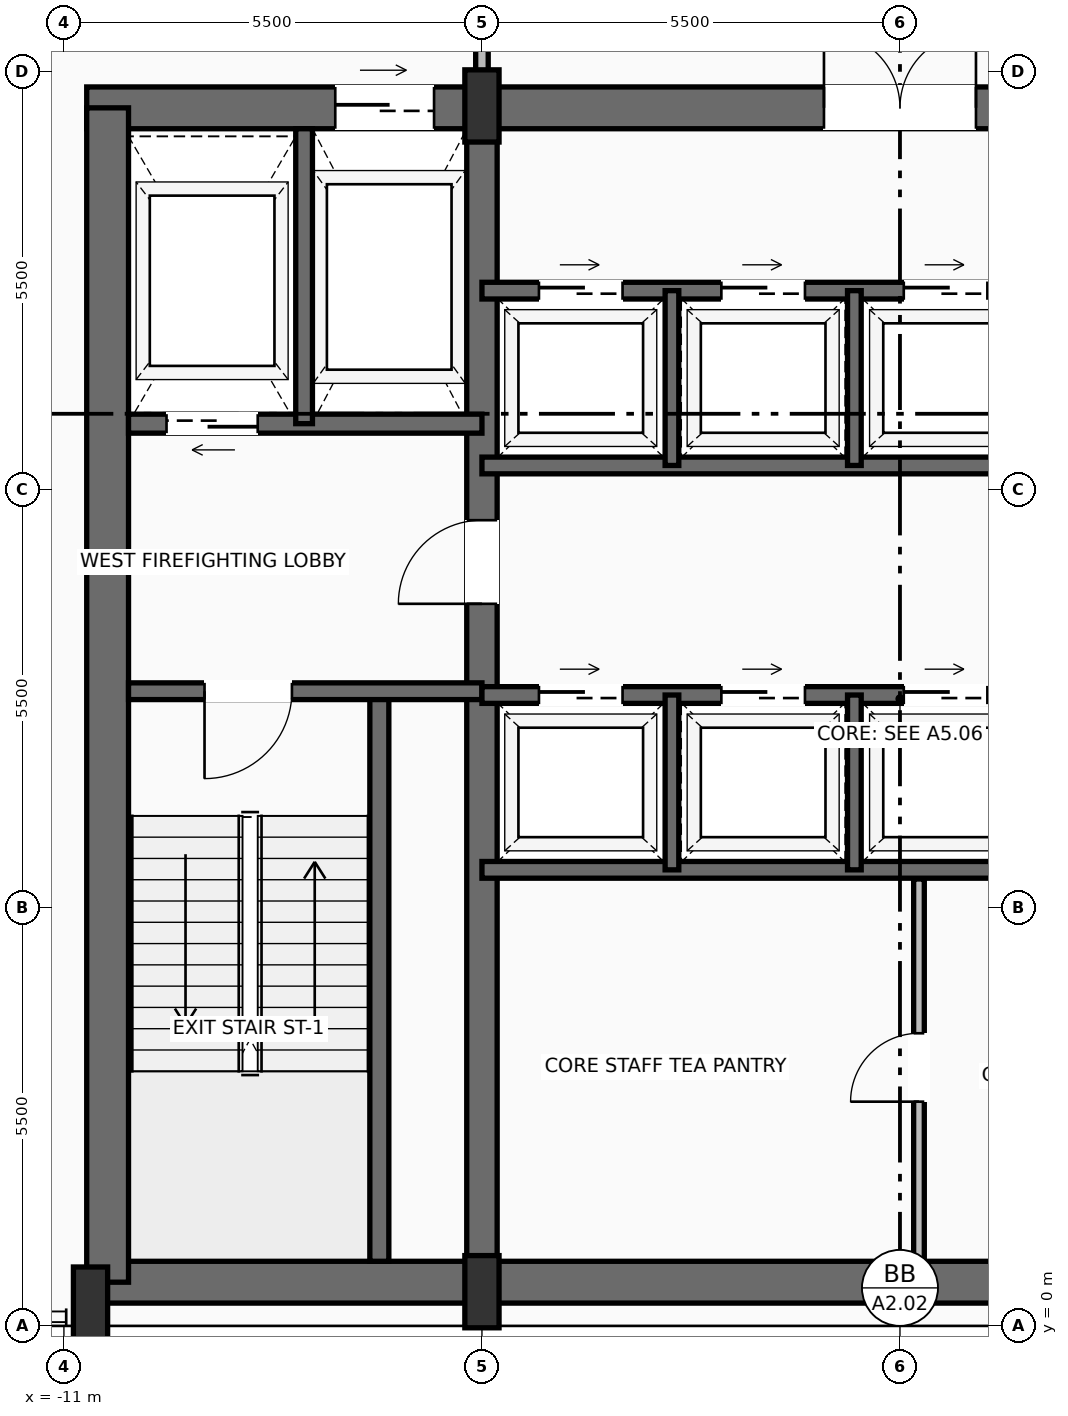
"""IFC4 building model, lengths in metres.
Left out: names, types, materials, properties, quantities, classifications, styles, units other than length and angle.
Written with IfcOpenShell. Run it as: python <this file> out.ifc"""

import sys

from ifc_helpers import new_model, si_unit, direction, frame, frame_2d, origin, origin_2d, place, context, subcontext, project, spatial, rectangle, extrude, source, transform, mapped, element, fill, save


model = new_model("IFC4")
c1 = context("Model", 3, precision=1e-05, world=origin(), true_north=direction((0.0, 1.0)))
c2 = subcontext(c1, "Body", "Model", "MODEL_VIEW")
j1 = project(units=[si_unit("LENGTHUNIT", "METRE"), si_unit("PLANEANGLEUNIT", "RADIAN")], contexts=[c1])
p1 = place(None, origin())
s1 = spatial("IfcSite", under=j1, at=p1, CompositionType="ELEMENT")
p2 = place(p1, origin())
s2 = spatial("IfcBuilding", under=s1, at=p2, CompositionType="ELEMENT")
p3 = place(p2, frame((0.0, 0.0, 215.4)))
s3 = spatial("IfcBuildingStorey", under=s2, at=p3, CompositionType="ELEMENT", Elevation=215.4)
p4 = place(p3, frame((-10.65, 0.575, 0.0), z_axis=(0.0, 0.0, 1.0), x_axis=(1.0, 0.0, 0.0)))
e1 = element("IfcWall", 1, at=p4, inside=s3, PredefinedType="SHEAR", context=c2, shape_type="SweptSolid", body=[
    extrude(rectangle(XDim=21.3, YDim=0.55, at=frame_2d((10.65, 0.0))), origin(), (0.0, 0.0, 1.0), 4.39),
])
p5 = place(p3, frame((-10.7, 16.025, 0.0), z_axis=(0.0, 0.0, 1.0), x_axis=(1.0, 0.0, 0.0)))
e2 = element("IfcWall", 2, at=p5, inside=s3, PredefinedType="SHEAR", context=c2, shape_type="SweptSolid", body=[
    extrude(rectangle(XDim=21.4, YDim=0.55, at=frame_2d((10.7, 0.0))), origin(), (0.0, 0.0, 1.0), 4.39),
])
p6 = place(p5, frame((3.27, 0.0, 0.0)))
e3 = element("IfcOpeningElement", 3, at=p6, cuts=e2, PredefinedType="OPENING", context=c2, shape_type="SweptSolid", body=[
    extrude(rectangle(XDim=1.3, YDim=2.3, at=frame_2d((0.65, 1.15))), frame((0.0, 0.285, 0.0), z_axis=(0.0, -1.0, 0.0), x_axis=(1.0, 0.0, 0.0)), (0.0, 0.0, 1.0), 0.57),
])
p7 = place(p5, frame((9.7, 0.0, 0.0)))
e4 = element("IfcOpeningElement", 4, at=p7, cuts=e2, PredefinedType="OPENING", context=c2, shape_type="SweptSolid", body=[
    extrude(rectangle(XDim=2.0, YDim=2.4, at=frame_2d((1.0, 1.2))), frame((0.0, 0.285, 0.0), z_axis=(0.0, -1.0, 0.0), x_axis=(1.0, 0.0, 0.0)), (0.0, 0.0, 1.0), 0.57),
])
p8 = place(p3, frame((-10.425, 0.575, 0.0), z_axis=(0.0, 0.0, 1.0), x_axis=(0.0, 1.0, 0.0)))
e5 = element("IfcWall", 5, at=p8, inside=s3, PredefinedType="SHEAR", context=c2, shape_type="SweptSolid", body=[
    extrude(rectangle(XDim=15.45, YDim=0.55, at=frame_2d((7.725, 0.0))), origin(), (0.0, 0.0, 1.0), 4.39),
])
p9 = place(p3, frame((-5.5, 0.575, 0.0), z_axis=(0.0, 0.0, 1.0), x_axis=(0.0, 1.0, 0.0)))
e6 = element("IfcWall", 6, at=p9, inside=s3, PredefinedType="SHEAR", context=c2, shape_type="SweptSolid", body=[
    extrude(rectangle(XDim=15.45, YDim=0.4, at=frame_2d((7.725, 0.0))), origin(), (0.0, 0.0, 1.0), 4.39),
])
p10 = place(p9, frame((8.925, 0.0, 0.0)))
e7 = element("IfcOpeningElement", 7, at=p10, cuts=e6, PredefinedType="OPENING", context=c2, shape_type="SweptSolid", body=[
    extrude(rectangle(XDim=1.1, YDim=2.2, at=frame_2d((0.55, 1.1))), frame((0.0, 0.21, 0.0), z_axis=(0.0, -1.0, 0.0), x_axis=(1.0, 0.0, 0.0)), (0.0, 0.0, 1.0), 0.42),
])
m1 = source(origin(), c2, "Body", "SweptSolid", [
    extrude(rectangle(XDim=0.45, YDim=0.95, at=origin_2d()), origin(), (0.0, 0.0, 1.0), 4.6),
])
for number, where, z_axis, x_axis in (
    (8, (-10.65, 0.3, 0.0), (0.0, 0.0, 1.0), (1.0, 0.0, 0.0)),
    (9, (-5.5, 0.45, 0.0), (0.0, 0.0, 1.0), (1.0, 0.0, 0.0)),
    (10, (-5.5, 16.05, 0.0), (0.0, 0.0, 1.0), (1.0, 0.0, 0.0)),
):
    element("IfcColumn", number, at=place(p3, frame(where, z_axis=z_axis, x_axis=x_axis)), inside=s3, PredefinedType="PILASTER", context=c2, shape_type="MappedRepresentation", body=[
        mapped(m1, transform((0.0, 0.0, 0.0), scale=1.0)),
    ])
p11 = place(p3, frame((-19.903, 15.656, 0.0), z_axis=(0.0, 0.0, 1.0), x_axis=(0.516051519047, 0.856557546047, 0.0)))
e11 = element("IfcWall", 11, at=p11, inside=s3, PredefinedType="SOLIDWALL", context=c2, shape_type="SweptSolid", body=[
    extrude(rectangle(XDim=19.259, YDim=0.28, at=frame_2d((9.63, 0.0))), origin(), (0.0, 0.0, 1.0), 3.97),
])
p12 = place(p11, frame((4.622, 0.0, 0.0)))
e12 = element("IfcOpeningElement", 12, at=p12, cuts=e11, PredefinedType="OPENING", context=c2, shape_type="SweptSolid", body=[
    extrude(rectangle(XDim=1.6, YDim=2.35, at=frame_2d((0.8, 1.175))), frame((0.0, 0.15, 0.0), z_axis=(0.0, -1.0, 0.0), x_axis=(1.0, 0.0, 0.0)), (0.0, 0.0, 1.0), 0.3),
])
p13 = place(p11, frame((13.096, 0.0, 0.9)))
e13 = element("IfcOpeningElement", 13, at=p13, cuts=e11, PredefinedType="OPENING", context=c2, shape_type="SweptSolid", body=[
    extrude(rectangle(XDim=2.0, YDim=1.55, at=frame_2d((1.0, 0.775))), frame((0.0, 0.15, 0.0), z_axis=(0.0, -1.0, 0.0), x_axis=(1.0, 0.0, 0.0)), (0.0, 0.0, 1.0), 0.3),
])
p14 = place(p3, frame((-6.85, 0.85, 0.0), z_axis=(0.0, 0.0, 1.0), x_axis=(0.0, 1.0, 0.0)))
e14 = element("IfcWall", 14, at=p14, inside=s3, PredefinedType="SOLIDWALL", context=c2, shape_type="SweptSolid", body=[
    extrude(rectangle(XDim=7.5, YDim=0.25, at=frame_2d((3.75, 0.0))), origin(), (0.0, 0.0, 1.0), 4.39),
])
p15 = place(p3, frame((-5.5, 8.35, 0.0), z_axis=(0.0, 0.0, 1.0), x_axis=(-1.0, 0.0, 0.0)))
e15 = element("IfcWall", 15, at=p15, inside=s3, PredefinedType="SOLIDWALL", context=c2, shape_type="SweptSolid", body=[
    extrude(rectangle(XDim=4.65, YDim=0.22, at=frame_2d((2.325, 0.0))), origin(), (0.0, 0.0, 1.0), 4.39),
])
p16 = place(p15, frame((2.5, 0.0, 0.0)))
e16 = element("IfcOpeningElement", 16, at=p16, cuts=e15, PredefinedType="OPENING", context=c2, shape_type="SweptSolid", body=[
    extrude(rectangle(XDim=1.15, YDim=2.2, at=frame_2d((0.575, 1.1))), frame((0.0, 0.12, 0.0), z_axis=(0.0, -1.0, 0.0), x_axis=(1.0, 0.0, 0.0)), (0.0, 0.0, 1.0), 0.24),
])
p17 = place(p3, frame((-5.5, 11.87, 0.0), z_axis=(0.0, 0.0, 1.0), x_axis=(-1.0, 0.0, 0.0)))
e17 = element("IfcWall", 17, at=p17, inside=s3, PredefinedType="SOLIDWALL", context=c2, shape_type="SweptSolid", body=[
    extrude(rectangle(XDim=4.65, YDim=0.25, at=frame_2d((2.325, 0.0))), origin(), (0.0, 0.0, 1.0), 4.39),
])
p18 = place(p17, frame((2.95, 0.0, 0.0)))
e18 = element("IfcOpeningElement", 18, at=p18, cuts=e17, PredefinedType="OPENING", context=c2, shape_type="SweptSolid", body=[
    extrude(rectangle(XDim=1.2, YDim=2.25, at=frame_2d((0.6, 1.125))), frame((0.0, 0.135, 0.0), z_axis=(0.0, -1.0, 0.0), x_axis=(1.0, 0.0, 0.0)), (0.0, 0.0, 1.0), 0.27),
])
p19 = place(p3, frame((-7.84, 11.87, 0.0), z_axis=(0.0, 0.0, 1.0), x_axis=(0.0, 1.0, 0.0)))
e19 = element("IfcWall", 19, at=p19, inside=s3, PredefinedType="SOLIDWALL", context=c2, shape_type="SweptSolid", body=[
    extrude(rectangle(XDim=3.88, YDim=0.22, at=frame_2d((1.94, 0.0))), origin(), (0.0, 0.0, 1.0), 4.39),
])
p20 = place(p3, frame((0.25, 0.85, 0.0), z_axis=(0.0, 0.0, 1.0), x_axis=(0.0, 1.0, 0.0)))
e20 = element("IfcWall", 20, at=p20, inside=s3, PredefinedType="PARTITIONING", context=c2, shape_type="SweptSolid", body=[
    extrude(rectangle(XDim=5.03, YDim=0.14, at=frame_2d((2.515, 0.0))), origin(), (0.0, 0.0, 1.0), 4.382),
])
p21 = place(p20, frame((2.1, 0.0, 0.0)))
e21 = element("IfcOpeningElement", 21, at=p21, cuts=e20, PredefinedType="OPENING", context=c2, shape_type="SweptSolid", body=[
    extrude(rectangle(XDim=0.9, YDim=2.1, at=frame_2d((0.45, 1.05))), frame((0.0, 0.08, 0.0), z_axis=(0.0, -1.0, 0.0), x_axis=(1.0, 0.0, 0.0)), (0.0, 0.0, 1.0), 0.16),
])
p22 = place(p3, frame((-5.5, 6.0, 0.0), z_axis=(0.0, 0.0, 1.0), x_axis=(1.0, 0.0, 0.0)))
e22 = element("IfcWall", 22, at=p22, inside=s3, PredefinedType="SOLIDWALL", context=c2, shape_type="SweptSolid", body=[
    extrude(rectangle(XDim=7.32, YDim=0.22, at=frame_2d((3.66, 0.0))), origin(), (0.0, 0.0, 1.0), 4.39),
])
p23 = place(p3, frame((-5.5, 8.3, 0.0), z_axis=(0.0, 0.0, 1.0), x_axis=(1.0, 0.0, 0.0)))
e23 = element("IfcWall", 23, at=p23, inside=s3, PredefinedType="SOLIDWALL", context=c2, shape_type="SweptSolid", body=[
    extrude(rectangle(XDim=7.32, YDim=0.22, at=frame_2d((3.66, 0.0))), origin(), (0.0, 0.0, 1.0), 4.39),
])
p24 = place(p23, frame((0.75, 0.0, 0.0)))
e24 = element("IfcOpeningElement", 24, at=p24, cuts=e23, PredefinedType="OPENING", context=c2, shape_type="SweptSolid", body=[
    extrude(rectangle(XDim=1.1, YDim=2.2, at=frame_2d((0.55, 1.1))), frame((0.0, 0.12, 0.0), z_axis=(0.0, -1.0, 0.0), x_axis=(1.0, 0.0, 0.0)), (0.0, 0.0, 1.0), 0.24),
])
p25 = place(p23, frame((3.15, 0.0, 0.0)))
e25 = element("IfcOpeningElement", 25, at=p25, cuts=e23, PredefinedType="OPENING", context=c2, shape_type="SweptSolid", body=[
    extrude(rectangle(XDim=1.1, YDim=2.2, at=frame_2d((0.55, 1.1))), frame((0.0, 0.12, 0.0), z_axis=(0.0, -1.0, 0.0), x_axis=(1.0, 0.0, 0.0)), (0.0, 0.0, 1.0), 0.24),
])
p26 = place(p23, frame((5.55, 0.0, 0.0)))
e26 = element("IfcOpeningElement", 26, at=p26, cuts=e23, PredefinedType="OPENING", context=c2, shape_type="SweptSolid", body=[
    extrude(rectangle(XDim=1.1, YDim=2.2, at=frame_2d((0.55, 1.1))), frame((0.0, 0.12, 0.0), z_axis=(0.0, -1.0, 0.0), x_axis=(1.0, 0.0, 0.0)), (0.0, 0.0, 1.0), 0.24),
])
for number, where, z_axis, x_axis in (
    (27, (-3.0, 6.0, 0.0), (0.0, 0.0, 1.0), (0.0, 1.0, 0.0)),
    (28, (-0.6, 6.0, 0.0), (0.0, 0.0, 1.0), (0.0, 1.0, 0.0)),
):
    element("IfcWall", number, at=place(p3, frame(where, z_axis=z_axis, x_axis=x_axis)), inside=s3, PredefinedType="SOLIDWALL", context=c2, shape_type="SweptSolid", body=[
        extrude(rectangle(XDim=2.3, YDim=0.18, at=frame_2d((1.15, 0.0))), origin(), (0.0, 0.0, 1.0), 4.39),
    ])
p27 = place(p3, frame((-5.5, 11.32, 0.0), z_axis=(0.0, 0.0, 1.0), x_axis=(1.0, 0.0, 0.0)))
e29 = element("IfcWall", 29, at=p27, inside=s3, PredefinedType="SOLIDWALL", context=c2, shape_type="SweptSolid", body=[
    extrude(rectangle(XDim=7.32, YDim=0.22, at=frame_2d((3.66, 0.0))), origin(), (0.0, 0.0, 1.0), 4.39),
])
p28 = place(p3, frame((-5.5, 13.62, 0.0), z_axis=(0.0, 0.0, 1.0), x_axis=(1.0, 0.0, 0.0)))
e30 = element("IfcWall", 30, at=p28, inside=s3, PredefinedType="SOLIDWALL", context=c2, shape_type="SweptSolid", body=[
    extrude(rectangle(XDim=7.32, YDim=0.22, at=frame_2d((3.66, 0.0))), origin(), (0.0, 0.0, 1.0), 4.39),
])
p29 = place(p28, frame((0.75, 0.0, 0.0)))
e31 = element("IfcOpeningElement", 31, at=p29, cuts=e30, PredefinedType="OPENING", context=c2, shape_type="SweptSolid", body=[
    extrude(rectangle(XDim=1.1, YDim=2.2, at=frame_2d((0.55, 1.1))), frame((0.0, 0.12, 0.0), z_axis=(0.0, -1.0, 0.0), x_axis=(1.0, 0.0, 0.0)), (0.0, 0.0, 1.0), 0.24),
])
p30 = place(p28, frame((3.15, 0.0, 0.0)))
e32 = element("IfcOpeningElement", 32, at=p30, cuts=e30, PredefinedType="OPENING", context=c2, shape_type="SweptSolid", body=[
    extrude(rectangle(XDim=1.1, YDim=2.2, at=frame_2d((0.55, 1.1))), frame((0.0, 0.12, 0.0), z_axis=(0.0, -1.0, 0.0), x_axis=(1.0, 0.0, 0.0)), (0.0, 0.0, 1.0), 0.24),
])
p31 = place(p28, frame((5.55, 0.0, 0.0)))
e33 = element("IfcOpeningElement", 33, at=p31, cuts=e30, PredefinedType="OPENING", context=c2, shape_type="SweptSolid", body=[
    extrude(rectangle(XDim=1.1, YDim=2.2, at=frame_2d((0.55, 1.1))), frame((0.0, 0.12, 0.0), z_axis=(0.0, -1.0, 0.0), x_axis=(1.0, 0.0, 0.0)), (0.0, 0.0, 1.0), 0.24),
])
for number, where, z_axis, x_axis in (
    (34, (-3.0, 11.32, 0.0), (0.0, 0.0, 1.0), (0.0, 1.0, 0.0)),
    (35, (-0.6, 11.32, 0.0), (0.0, 0.0, 1.0), (0.0, 1.0, 0.0)),
):
    element("IfcWall", number, at=place(p3, frame(where, z_axis=z_axis, x_axis=x_axis)), inside=s3, PredefinedType="SOLIDWALL", context=c2, shape_type="SweptSolid", body=[
        extrude(rectangle(XDim=2.3, YDim=0.18, at=frame_2d((1.15, 0.0))), origin(), (0.0, 0.0, 1.0), 4.39),
    ])
p32 = place(p3, frame((-5.5, 16.32, 0.0), z_axis=(0.0, 0.0, 1.0), x_axis=(0.0, 1.0, 0.0)))
e36 = element("IfcWall", 36, at=p32, inside=s3, PredefinedType="PARTITIONING", context=c2, shape_type="SweptSolid", body=[
    extrude(rectangle(XDim=23.493, YDim=0.165, at=frame_2d((11.747, 0.0))), origin(), (0.0, 0.0, 1.0), 3.833),
])
p33 = place(p32, frame((5.293, 0.0, 0.0)))
e37 = element("IfcOpeningElement", 37, at=p33, cuts=e36, PredefinedType="OPENING", context=c2, shape_type="SweptSolid", body=[
    extrude(rectangle(XDim=1.5, YDim=2.25, at=frame_2d((0.75, 1.125))), frame((0.0, 0.093, 0.0), z_axis=(0.0, -1.0, 0.0), x_axis=(1.0, 0.0, 0.0)), (0.0, 0.0, 1.0), 0.185),
])
m2 = source(origin(), c2, "Body", "SweptSolid", [
    extrude(rectangle(XDim=1.15, YDim=2.2, at=frame_2d((0.575, 1.1))), frame((0.0, 0.025, 0.0), z_axis=(0.0, -1.0, 0.0), x_axis=(1.0, 0.0, 0.0)), (0.0, 0.0, 1.0), 0.05),
])
p34 = place(p16, origin())
e38 = element("IfcDoor", 38, at=p34, inside=s3, OperationType="SINGLE_SWING_RIGHT", PredefinedType="DOOR", context=c2, shape_type="MappedRepresentation", body=[
    mapped(m2, transform((0.0, 0.0, 0.0), scale=1.0)),
])
fill(e16, e38)
m3 = source(origin(), c2, "Body", "SweptSolid", [
    extrude(rectangle(XDim=1.1, YDim=2.2, at=frame_2d((0.55, 1.1))), frame((0.0, 0.025, 0.0), z_axis=(0.0, -1.0, 0.0), x_axis=(1.0, 0.0, 0.0)), (0.0, 0.0, 1.0), 0.05),
])
p35 = place(p10, origin())
e39 = element("IfcDoor", 39, at=p35, inside=s3, OperationType="SINGLE_SWING_LEFT", PredefinedType="DOOR", context=c2, shape_type="MappedRepresentation", body=[
    mapped(m3, transform((0.0, 0.0, 0.0), scale=1.0)),
])
fill(e7, e39)
m4 = source(origin(), c2, "Body", "SweptSolid", [
    extrude(rectangle(XDim=1.2, YDim=2.25, at=frame_2d((0.6, 1.125))), frame((0.0, 0.025, 0.0), z_axis=(0.0, -1.0, 0.0), x_axis=(1.0, 0.0, 0.0)), (0.0, 0.0, 1.0), 0.05),
])
p36 = place(p18, origin())
e40 = element("IfcDoor", 40, at=p36, inside=s3, OperationType="SLIDING_TO_LEFT", PredefinedType="DOOR", context=c2, shape_type="MappedRepresentation", body=[
    mapped(m4, transform((0.0, 0.0, 0.0), scale=1.0)),
])
fill(e18, e40)
m5 = source(origin(), c2, "Body", "SweptSolid", [
    extrude(rectangle(XDim=1.3, YDim=2.3, at=frame_2d((0.65, 1.15))), frame((0.0, 0.025, 0.0), z_axis=(0.0, -1.0, 0.0), x_axis=(1.0, 0.0, 0.0)), (0.0, 0.0, 1.0), 0.05),
])
p37 = place(p6, origin())
e41 = element("IfcDoor", 41, at=p37, inside=s3, OperationType="SLIDING_TO_RIGHT", PredefinedType="DOOR", context=c2, shape_type="MappedRepresentation", body=[
    mapped(m5, transform((0.0, 0.0, 0.0), scale=1.0)),
])
fill(e3, e41)
m6 = source(origin(), c2, "Body", "SweptSolid", [
    extrude(rectangle(XDim=2.0, YDim=2.4, at=frame_2d((1.0, 1.2))), frame((0.0, 0.025, 0.0), z_axis=(0.0, -1.0, 0.0), x_axis=(1.0, 0.0, 0.0)), (0.0, 0.0, 1.0), 0.05),
])
p38 = place(p7, origin())
e42 = element("IfcDoor", 42, at=p38, inside=s3, OperationType="DOUBLE_DOOR_SINGLE_SWING", PredefinedType="DOOR", context=c2, shape_type="MappedRepresentation", body=[
    mapped(m6, transform((0.0, 0.0, 0.0), scale=1.0)),
])
fill(e4, e42)
m7 = source(origin(), c2, "Body", "SweptSolid", [
    extrude(rectangle(XDim=0.9, YDim=2.1, at=frame_2d((0.45, 1.05))), frame((0.0, 0.025, 0.0), z_axis=(0.0, -1.0, 0.0), x_axis=(1.0, 0.0, 0.0)), (0.0, 0.0, 1.0), 0.05),
])
p39 = place(p21, origin())
e43 = element("IfcDoor", 43, at=p39, inside=s3, OperationType="SINGLE_SWING_LEFT", PredefinedType="DOOR", context=c2, shape_type="MappedRepresentation", body=[
    mapped(m7, transform((0.0, 0.0, 0.0), scale=1.0)),
])
fill(e21, e43)
m8 = source(origin(), c2, "Body", "SweptSolid", [
    extrude(rectangle(XDim=1.1, YDim=2.2, at=frame_2d((0.55, 1.1))), frame((0.0, 0.025, 0.0), z_axis=(0.0, -1.0, 0.0), x_axis=(1.0, 0.0, 0.0)), (0.0, 0.0, 1.0), 0.05),
])
p40 = place(p24, origin())
e44 = element("IfcDoor", 44, at=p40, inside=s3, OperationType="SLIDING_TO_LEFT", PredefinedType="DOOR", context=c2, shape_type="MappedRepresentation", body=[
    mapped(m8, transform((0.0, 0.0, 0.0), scale=1.0)),
])
fill(e24, e44)
p41 = place(p25, origin())
e45 = element("IfcDoor", 45, at=p41, inside=s3, OperationType="SLIDING_TO_LEFT", PredefinedType="DOOR", context=c2, shape_type="MappedRepresentation", body=[
    mapped(m8, transform((0.0, 0.0, 0.0), scale=1.0)),
])
fill(e25, e45)
p42 = place(p26, origin())
e46 = element("IfcDoor", 46, at=p42, inside=s3, OperationType="SLIDING_TO_LEFT", PredefinedType="DOOR", context=c2, shape_type="MappedRepresentation", body=[
    mapped(m8, transform((0.0, 0.0, 0.0), scale=1.0)),
])
fill(e26, e46)
p43 = place(p29, origin())
e47 = element("IfcDoor", 47, at=p43, inside=s3, OperationType="SLIDING_TO_RIGHT", PredefinedType="DOOR", context=c2, shape_type="MappedRepresentation", body=[
    mapped(m8, transform((0.0, 0.0, 0.0), scale=1.0)),
])
fill(e31, e47)
p44 = place(p30, origin())
e48 = element("IfcDoor", 48, at=p44, inside=s3, OperationType="SLIDING_TO_RIGHT", PredefinedType="DOOR", context=c2, shape_type="MappedRepresentation", body=[
    mapped(m8, transform((0.0, 0.0, 0.0), scale=1.0)),
])
fill(e32, e48)
p45 = place(p31, origin())
e49 = element("IfcDoor", 49, at=p45, inside=s3, OperationType="SLIDING_TO_RIGHT", PredefinedType="DOOR", context=c2, shape_type="MappedRepresentation", body=[
    mapped(m8, transform((0.0, 0.0, 0.0), scale=1.0)),
])
fill(e33, e49)
save(model, sys.argv[1])
